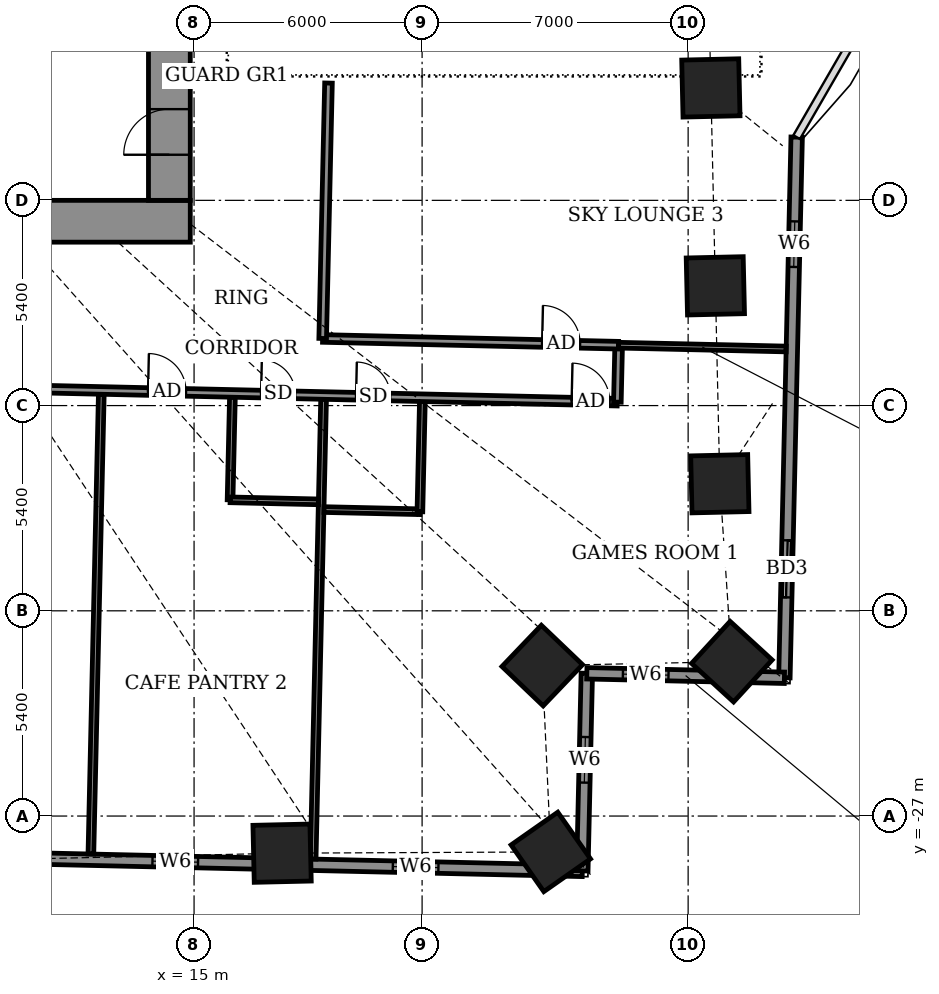
"""IFC4 building model, lengths in metres.
Left out: names, types, materials, properties, quantities, classifications, styles, units other than length and angle.
Written with IfcOpenShell. Run it as: python <this file> out.ifc"""

import sys

from ifc_helpers import new_model, si_unit, direction, frame, frame_2d, origin, origin_2d, place, context, subcontext, project, spatial, rectangle, extrude, element, fill, save


model = new_model("IFC4")
c1 = context("Model", 3, precision=1e-05, world=origin(), true_north=direction((0.0, 1.0)))
c2 = subcontext(c1, "Body", "Model", "MODEL_VIEW")
j1 = project(units=[si_unit("LENGTHUNIT", "METRE"), si_unit("PLANEANGLEUNIT", "RADIAN")], contexts=[c1])
p1 = place(None, origin())
s1 = spatial("IfcSite", under=j1, at=p1, CompositionType="ELEMENT")
p2 = place(p1, origin())
s2 = spatial("IfcBuilding", under=s1, at=p2, CompositionType="ELEMENT")
p3 = place(p2, frame((0.0, 0.0, 52.1)))
s3 = spatial("IfcBuildingStorey", under=s2, at=p3, CompositionType="ELEMENT", Elevation=52.1)
for number, where, z_axis, x_axis in (
    (1, (17.316, -27.977, -0.55), (0.0, 0.0, 1.0), (1.0, 0.023, 0.0)),
    (2, (24.386, -27.944, -0.55), (0.0, 0.0, 1.0), (0.819, 0.574, 0.0)),
    (3, (24.162, -23.041, -0.55), (0.0, 0.0, 1.0), (0.691, 0.723, 0.0)),
    (4, (29.15, -22.938, -0.55), (0.0, 0.0, 1.0), (0.676, 0.737, 0.0)),
    (5, (28.834, -18.256, -0.55), (0.0, 0.0, 1.0), (-0.023, 1.0, 0.0)),
    (6, (28.716, -13.049, -0.55), (0.0, 0.0, 1.0), (-0.023, 1.0, 0.0)),
    (7, (28.598, -7.842, -0.55), (0.0, 0.0, 1.0), (-0.023, 1.0, 0.0)),
):
    element("IfcColumn", number, at=place(p3, frame(where, z_axis=z_axis, x_axis=x_axis)), inside=s3, PredefinedType="COLUMN", context=c2, shape_type="SweptSolid", body=[
        extrude(rectangle(XDim=1.5, YDim=1.5, at=origin_2d()), origin(), (0.0, 0.0, 1.0), 4.6),
    ])
p4 = place(p3, frame((30.533, -23.362, 0.0), z_axis=(0.0, 0.0, 1.0), x_axis=(0.022698800888, 0.999742349027, 0.0)))
e8 = element("IfcWall", 8, at=p4, inside=s3, PredefinedType="SOLIDWALL", context=c2, shape_type="SweptSolid", body=[
    extrude(rectangle(XDim=14.23, YDim=0.3, at=frame_2d((7.115, 0.0))), origin(), (0.0, 0.0, 1.0), 2.25),
])
p5 = place(p4, frame((2.117, 0.0, 0.0)))
e9 = element("IfcOpeningElement", 9, at=p5, cuts=e8, PredefinedType="OPENING", context=c2, shape_type="SweptSolid", body=[
    extrude(rectangle(XDim=1.5, YDim=2.0, at=frame_2d((0.75, 1.0))), frame((0.0, 0.16, 0.0), z_axis=(0.0, -1.0, 0.0), x_axis=(1.0, 0.0, 0.0)), (0.0, 0.0, 1.0), 0.32),
])
p6 = place(p4, frame((10.812, 0.0, 0.5)))
e10 = element("IfcOpeningElement", 10, at=p6, cuts=e8, PredefinedType="OPENING", context=c2, shape_type="SweptSolid", body=[
    extrude(rectangle(XDim=1.2, YDim=1.1, at=frame_2d((0.6, 0.55))), frame((0.0, 0.16, 0.0), z_axis=(0.0, -1.0, 0.0), x_axis=(1.0, 0.0, 0.0)), (0.0, 0.0, 1.0), 0.32),
])
p7 = place(p3, frame((-24.007, -27.326, 0.0), z_axis=(0.0, 0.0, 1.0), x_axis=(0.999742536491, -0.022690542744, 0.0)))
e11 = element("IfcWall", 11, at=p7, inside=s3, PredefinedType="SOLIDWALL", context=c2, shape_type="SweptSolid", body=[
    extrude(rectangle(XDim=49.236, YDim=0.3, at=frame_2d((24.618, 0.0))), origin(), (0.0, 0.0, 1.0), 2.1),
])
p8 = place(p7, frame((0.878, 0.0, 0.0)))
e12 = element("IfcOpeningElement", 12, at=p8, cuts=e11, PredefinedType="OPENING", context=c2, shape_type="SweptSolid", body=[
    extrude(rectangle(XDim=1.5, YDim=2.0, at=frame_2d((0.75, 1.0))), frame((0.0, 0.16, 0.0), z_axis=(0.0, -1.0, 0.0), x_axis=(1.0, 0.0, 0.0)), (0.0, 0.0, 1.0), 0.32),
])
p9 = place(p7, frame((7.616, 0.0, 0.5)))
e13 = element("IfcOpeningElement", 13, at=p9, cuts=e11, PredefinedType="OPENING", context=c2, shape_type="SweptSolid", body=[
    extrude(rectangle(XDim=1.2, YDim=1.1, at=frame_2d((0.6, 0.55))), frame((0.0, 0.16, 0.0), z_axis=(0.0, -1.0, 0.0), x_axis=(1.0, 0.0, 0.0)), (0.0, 0.0, 1.0), 0.32),
])
p10 = place(p7, frame((15.205, 0.0, 0.0)))
e14 = element("IfcOpeningElement", 14, at=p10, cuts=e11, PredefinedType="OPENING", context=c2, shape_type="SweptSolid", body=[
    extrude(rectangle(XDim=1.5, YDim=2.0, at=frame_2d((0.75, 1.0))), frame((0.0, 0.16, 0.0), z_axis=(0.0, -1.0, 0.0), x_axis=(1.0, 0.0, 0.0)), (0.0, 0.0, 1.0), 0.32),
])
p11 = place(p7, frame((20.663, 0.0, 0.0)))
e15 = element("IfcOpeningElement", 15, at=p11, cuts=e11, PredefinedType="OPENING", context=c2, shape_type="SweptSolid", body=[
    extrude(rectangle(XDim=1.5, YDim=2.0, at=frame_2d((0.75, 1.0))), frame((0.0, 0.16, 0.0), z_axis=(0.0, -1.0, 0.0), x_axis=(1.0, 0.0, 0.0)), (0.0, 0.0, 1.0), 0.32),
])
p12 = place(p7, frame((23.869, 0.0, 0.0)))
e16 = element("IfcOpeningElement", 16, at=p12, cuts=e11, PredefinedType="OPENING", context=c2, shape_type="SweptSolid", body=[
    extrude(rectangle(XDim=1.5, YDim=2.0, at=frame_2d((0.75, 1.0))), frame((0.0, 0.16, 0.0), z_axis=(0.0, -1.0, 0.0), x_axis=(1.0, 0.0, 0.0)), (0.0, 0.0, 1.0), 0.32),
])
p13 = place(p7, frame((30.183, 0.0, 0.5)))
e17 = element("IfcOpeningElement", 17, at=p13, cuts=e11, PredefinedType="OPENING", context=c2, shape_type="SweptSolid", body=[
    extrude(rectangle(XDim=1.2, YDim=1.1, at=frame_2d((0.6, 0.55))), frame((0.0, 0.16, 0.0), z_axis=(0.0, -1.0, 0.0), x_axis=(1.0, 0.0, 0.0)), (0.0, 0.0, 1.0), 0.32),
])
p14 = place(p7, frame((37.922, 0.0, 0.5)))
e18 = element("IfcOpeningElement", 18, at=p14, cuts=e11, PredefinedType="OPENING", context=c2, shape_type="SweptSolid", body=[
    extrude(rectangle(XDim=1.2, YDim=1.1, at=frame_2d((0.6, 0.55))), frame((0.0, 0.16, 0.0), z_axis=(0.0, -1.0, 0.0), x_axis=(1.0, 0.0, 0.0)), (0.0, 0.0, 1.0), 0.32),
])
p15 = place(p7, frame((44.248, 0.0, 0.5)))
e19 = element("IfcOpeningElement", 19, at=p15, cuts=e11, PredefinedType="OPENING", context=c2, shape_type="SweptSolid", body=[
    extrude(rectangle(XDim=1.2, YDim=1.1, at=frame_2d((0.6, 0.55))), frame((0.0, 0.16, 0.0), z_axis=(0.0, -1.0, 0.0), x_axis=(1.0, 0.0, 0.0)), (0.0, 0.0, 1.0), 0.32),
])
p16 = place(p3, frame((25.216, -28.443, 0.0), z_axis=(0.0, 0.0, 1.0), x_axis=(0.022674484462, 0.999742900827, 0.0)))
e20 = element("IfcWall", 20, at=p16, inside=s3, PredefinedType="SOLIDWALL", context=c2, shape_type="SweptSolid", body=[
    extrude(rectangle(XDim=5.2, YDim=0.3, at=frame_2d((2.6, 0.0))), origin(), (0.0, 0.0, 1.0), 2.35),
])
p17 = place(p16, frame((2.323, 0.0, 0.5)))
e21 = element("IfcOpeningElement", 21, at=p17, cuts=e20, PredefinedType="OPENING", context=c2, shape_type="SweptSolid", body=[
    extrude(rectangle(XDim=1.2, YDim=1.1, at=frame_2d((0.6, 0.55))), frame((0.0, 0.16, 0.0), z_axis=(0.0, -1.0, 0.0), x_axis=(1.0, 0.0, 0.0)), (0.0, 0.0, 1.0), 0.32),
])
p18 = place(p3, frame((25.334, -23.244, 0.0), z_axis=(0.0, 0.0, 1.0), x_axis=(0.999741811307, -0.022722471786, 0.0)))
e22 = element("IfcWall", 22, at=p18, inside=s3, PredefinedType="SOLIDWALL", context=c2, shape_type="SweptSolid", body=[
    extrude(rectangle(XDim=5.2, YDim=0.3, at=frame_2d((2.6, 0.0))), origin(), (0.0, 0.0, 1.0), 2.25),
])
p19 = place(p18, frame((0.95, 0.0, 0.5)))
e23 = element("IfcOpeningElement", 23, at=p19, cuts=e22, PredefinedType="OPENING", context=c2, shape_type="SweptSolid", body=[
    extrude(rectangle(XDim=1.2, YDim=1.1, at=frame_2d((0.6, 0.55))), frame((0.0, 0.16, 0.0), z_axis=(0.0, -1.0, 0.0), x_axis=(1.0, 0.0, 0.0)), (0.0, 0.0, 1.0), 0.32),
])
p20 = place(p3, frame((12.285, -27.999, 0.0), z_axis=(0.0, 0.0, 1.0), x_axis=(0.022658614335, 0.999743260641, 0.0)))
e24 = element("IfcWall", 24, at=p20, inside=s3, PredefinedType="PARTITIONING", context=c2, shape_type="SweptSolid", body=[
    extrude(rectangle(XDim=12.1, YDim=0.15, at=frame_2d((6.05, 0.0))), origin(), (0.0, 0.0, 1.0), 2.15),
])
p21 = place(p3, frame((18.133, -28.132, 0.0), z_axis=(0.0, 0.0, 1.0), x_axis=(0.022718655443, 0.999741898039, 0.0)))
e25 = element("IfcWall", 25, at=p21, inside=s3, PredefinedType="PARTITIONING", context=c2, shape_type="SweptSolid", body=[
    extrude(rectangle(XDim=12.1, YDim=0.15, at=frame_2d((6.05, 0.0))), origin(), (0.0, 0.0, 1.0), 2.1),
])
p22 = place(p3, frame((18.419, -18.936, 0.0), z_axis=(0.0, 0.0, 1.0), x_axis=(0.999746356616, -0.022521599255, 0.0)))
e26 = element("IfcWall", 26, at=p22, inside=s3, PredefinedType="PARTITIONING", context=c2, shape_type="SweptSolid", body=[
    extrude(rectangle(XDim=2.526, YDim=0.15, at=frame_2d((1.263, 0.0))), origin(), (0.0, 0.0, 1.0), 2.35),
])
p23 = place(p3, frame((20.942, -18.993, 0.0), z_axis=(0.0, 0.0, 1.0), x_axis=(0.022480421481, 0.999747283392, 0.0)))
e27 = element("IfcWall", 27, at=p23, inside=s3, PredefinedType="PARTITIONING", context=c2, shape_type="SweptSolid", body=[
    extrude(rectangle(XDim=2.9, YDim=0.15, at=frame_2d((1.45, 0.0))), origin(), (0.0, 0.0, 1.0), 2.25),
])
p24 = place(p3, frame((15.947, -18.68, 0.0), z_axis=(0.0, 0.0, 1.0), x_axis=(0.022969966847, 0.999736155505, 0.0)))
e28 = element("IfcWall", 28, at=p24, inside=s3, PredefinedType="PARTITIONING", context=c2, shape_type="SweptSolid", body=[
    extrude(rectangle(XDim=2.7, YDim=0.15, at=frame_2d((1.35, 0.0))), origin(), (0.0, 0.0, 1.0), 2.1),
])
p25 = place(p3, frame((15.949, -18.68, 0.0), z_axis=(0.0, 0.0, 1.0), x_axis=(0.999740478815, -0.022781023197, 0.0)))
e29 = element("IfcWall", 29, at=p25, inside=s3, PredefinedType="PARTITIONING", context=c2, shape_type="SweptSolid", body=[
    extrude(rectangle(XDim=2.325, YDim=0.15, at=frame_2d((1.163, 0.0))), origin(), (0.0, 0.0, 1.0), 2.1),
])
p26 = place(p3, frame((-26.876, -14.907, 0.0), z_axis=(0.0, 0.0, 1.0), x_axis=(0.99974254105, -0.022690341881, 0.0)))
e30 = element("IfcWall", 30, at=p26, inside=s3, PredefinedType="PARTITIONING", context=c2, shape_type="SweptSolid", body=[
    extrude(rectangle(XDim=53.024, YDim=0.2, at=frame_2d((26.512, 0.0))), origin(), (0.0, 0.0, 1.0), 2.1),
])
p27 = place(p26, frame((3.599, 0.0, 0.0)))
e31 = element("IfcOpeningElement", 31, at=p27, cuts=e30, PredefinedType="OPENING", context=c2, shape_type="SweptSolid", body=[
    extrude(rectangle(XDim=1.0, YDim=2.1, at=frame_2d((0.5, 1.05))), frame((0.0, 0.11, 0.0), z_axis=(0.0, -1.0, 0.0), x_axis=(1.0, 0.0, 0.0)), (0.0, 0.0, 1.0), 0.22),
])
p28 = place(p26, frame((13.425, 0.0, 0.0)))
e32 = element("IfcOpeningElement", 32, at=p28, cuts=e30, PredefinedType="OPENING", context=c2, shape_type="SweptSolid", body=[
    extrude(rectangle(XDim=1.0, YDim=2.1, at=frame_2d((0.5, 1.05))), frame((0.0, 0.11, 0.0), z_axis=(0.0, -1.0, 0.0), x_axis=(1.0, 0.0, 0.0)), (0.0, 0.0, 1.0), 0.22),
])
p29 = place(p26, frame((9.5, 0.0, 0.0)))
e33 = element("IfcOpeningElement", 33, at=p29, cuts=e30, PredefinedType="OPENING", context=c2, shape_type="SweptSolid", body=[
    extrude(rectangle(XDim=0.9, YDim=2.1, at=frame_2d((0.45, 1.05))), frame((0.0, 0.11, 0.0), z_axis=(0.0, -1.0, 0.0), x_axis=(1.0, 0.0, 0.0)), (0.0, 0.0, 1.0), 0.22),
])
p30 = place(p26, frame((17.525, 0.0, 0.0)))
e34 = element("IfcOpeningElement", 34, at=p30, cuts=e30, PredefinedType="OPENING", context=c2, shape_type="SweptSolid", body=[
    extrude(rectangle(XDim=0.9, YDim=2.1, at=frame_2d((0.45, 1.05))), frame((0.0, 0.11, 0.0), z_axis=(0.0, -1.0, 0.0), x_axis=(1.0, 0.0, 0.0)), (0.0, 0.0, 1.0), 0.22),
])
p31 = place(p26, frame((24.85, 0.0, 0.0)))
e35 = element("IfcOpeningElement", 35, at=p31, cuts=e30, PredefinedType="OPENING", context=c2, shape_type="SweptSolid", body=[
    extrude(rectangle(XDim=0.9, YDim=2.1, at=frame_2d((0.45, 1.05))), frame((0.0, 0.11, 0.0), z_axis=(0.0, -1.0, 0.0), x_axis=(1.0, 0.0, 0.0)), (0.0, 0.0, 1.0), 0.22),
])
p32 = place(p26, frame((27.35, 0.0, 0.0)))
e36 = element("IfcOpeningElement", 36, at=p32, cuts=e30, PredefinedType="OPENING", context=c2, shape_type="SweptSolid", body=[
    extrude(rectangle(XDim=0.9, YDim=2.1, at=frame_2d((0.45, 1.05))), frame((0.0, 0.11, 0.0), z_axis=(0.0, -1.0, 0.0), x_axis=(1.0, 0.0, 0.0)), (0.0, 0.0, 1.0), 0.22),
])
p33 = place(p26, frame((36.15, 0.0, 0.0)))
e37 = element("IfcOpeningElement", 37, at=p33, cuts=e30, PredefinedType="OPENING", context=c2, shape_type="SweptSolid", body=[
    extrude(rectangle(XDim=1.0, YDim=2.1, at=frame_2d((0.5, 1.05))), frame((0.0, 0.11, 0.0), z_axis=(0.0, -1.0, 0.0), x_axis=(1.0, 0.0, 0.0)), (0.0, 0.0, 1.0), 0.22),
])
p34 = place(p26, frame((32.2, 0.0, 0.0)))
e38 = element("IfcOpeningElement", 38, at=p34, cuts=e30, PredefinedType="OPENING", context=c2, shape_type="SweptSolid", body=[
    extrude(rectangle(XDim=0.9, YDim=2.1, at=frame_2d((0.45, 1.05))), frame((0.0, 0.11, 0.0), z_axis=(0.0, -1.0, 0.0), x_axis=(1.0, 0.0, 0.0)), (0.0, 0.0, 1.0), 0.22),
])
p35 = place(p26, frame((40.675, 0.0, 0.0)))
e39 = element("IfcOpeningElement", 39, at=p35, cuts=e30, PredefinedType="OPENING", context=c2, shape_type="SweptSolid", body=[
    extrude(rectangle(XDim=1.0, YDim=2.1, at=frame_2d((0.5, 1.05))), frame((0.0, 0.11, 0.0), z_axis=(0.0, -1.0, 0.0), x_axis=(1.0, 0.0, 0.0)), (0.0, 0.0, 1.0), 0.22),
])
p36 = place(p26, frame((43.65, 0.0, 0.0)))
e40 = element("IfcOpeningElement", 40, at=p36, cuts=e30, PredefinedType="OPENING", context=c2, shape_type="SweptSolid", body=[
    extrude(rectangle(XDim=0.9, YDim=2.1, at=frame_2d((0.45, 1.05))), frame((0.0, 0.11, 0.0), z_axis=(0.0, -1.0, 0.0), x_axis=(1.0, 0.0, 0.0)), (0.0, 0.0, 1.0), 0.22),
])
p37 = place(p26, frame((51.824, 0.0, 0.0)))
e41 = element("IfcOpeningElement", 41, at=p37, cuts=e30, PredefinedType="OPENING", context=c2, shape_type="SweptSolid", body=[
    extrude(rectangle(XDim=1.0, YDim=2.1, at=frame_2d((0.5, 1.05))), frame((0.0, 0.11, 0.0), z_axis=(0.0, -1.0, 0.0), x_axis=(1.0, 0.0, 0.0)), (0.0, 0.0, 1.0), 0.22),
])
p38 = place(p26, frame((46.15, 0.0, 0.0)))
e42 = element("IfcOpeningElement", 42, at=p38, cuts=e30, PredefinedType="OPENING", context=c2, shape_type="SweptSolid", body=[
    extrude(rectangle(XDim=0.9, YDim=2.1, at=frame_2d((0.45, 1.05))), frame((0.0, 0.11, 0.0), z_axis=(0.0, -1.0, 0.0), x_axis=(1.0, 0.0, 0.0)), (0.0, 0.0, 1.0), 0.22),
])
p39 = place(p3, frame((26.138, -16.11, 0.0), z_axis=(0.0, 0.0, 1.0), x_axis=(0.02279537805, 0.999740151609, 0.0)))
e43 = element("IfcWall", 43, at=p39, inside=s3, PredefinedType="PARTITIONING", context=c2, shape_type="SweptSolid", body=[
    extrude(rectangle(XDim=1.5, YDim=0.2, at=frame_2d((0.75, 0.0))), origin(), (0.0, 0.0, 1.0), 4.05),
])
p40 = place(p3, frame((18.382, -14.434, 0.0), z_axis=(0.0, 0.0, 1.0), x_axis=(0.999741689867, -0.022727814278, 0.0)))
e44 = element("IfcWall", 44, at=p40, inside=s3, PredefinedType="PARTITIONING", context=c2, shape_type="SweptSolid", body=[
    extrude(rectangle(XDim=7.788, YDim=0.2, at=frame_2d((3.894, 0.0))), origin(), (0.0, 0.0, 1.0), 2.25),
])
p41 = place(p40, frame((5.777, 0.0, 0.0)))
e45 = element("IfcOpeningElement", 45, at=p41, cuts=e44, PredefinedType="OPENING", context=c2, shape_type="SweptSolid", body=[
    extrude(rectangle(XDim=1.0, YDim=2.1, at=frame_2d((0.5, 1.05))), frame((0.0, 0.11, 0.0), z_axis=(0.0, -1.0, 0.0), x_axis=(1.0, 0.0, 0.0)), (0.0, 0.0, 1.0), 0.22),
])
p42 = place(p3, frame((18.384, -14.434, 0.0), z_axis=(0.0, 0.0, 1.0), x_axis=(0.022773383809, 0.999740652864, 0.0)))
e46 = element("IfcWall", 46, at=p42, inside=s3, PredefinedType="PARTITIONING", context=c2, shape_type="SweptSolid", body=[
    extrude(rectangle(XDim=6.722, YDim=0.2, at=frame_2d((3.361, 0.0))), origin(), (0.0, 0.0, 1.0), 2.25),
])
p43 = place(p3, frame((26.168, -14.611, 0.0), z_axis=(0.0, 0.0, 1.0), x_axis=(0.999743888199, -0.022630908251, 0.0)))
e47 = element("IfcWall", 47, at=p43, inside=s3, PredefinedType="PARTITIONING", context=c2, shape_type="SweptSolid", body=[
    extrude(rectangle(XDim=4.412, YDim=0.15, at=frame_2d((2.206, 0.0))), origin(), (0.0, 0.0, 1.0), 2.35),
])
p44 = place(p3, frame((-14.9, -11.35, 0.0), z_axis=(0.0, 0.0, 1.0), x_axis=(1.0, 0.0, 0.0)))
e48 = element("IfcWall", 48, at=p44, inside=s3, PredefinedType="SHEAR", context=c2, shape_type="SweptSolid", body=[
    extrude(rectangle(XDim=29.8, YDim=1.1, at=frame_2d((14.9, 0.0))), origin(), (0.0, 0.0, 1.0), 4.6),
])
p45 = place(p3, frame((14.35, -10.8, 0.0), z_axis=(0.0, 0.0, 1.0), x_axis=(0.0, 1.0, 0.0)))
e49 = element("IfcWall", 49, at=p45, inside=s3, PredefinedType="SHEAR", context=c2, shape_type="SweptSolid", body=[
    extrude(rectangle(XDim=21.6, YDim=1.1, at=frame_2d((10.8, 0.0))), origin(), (0.0, 0.0, 1.0), 4.6),
])
p46 = place(p45, frame((1.2, 0.0, 0.0)))
e50 = element("IfcOpeningElement", 50, at=p46, cuts=e49, PredefinedType="OPENING", context=c2, shape_type="SweptSolid", body=[
    extrude(rectangle(XDim=1.2, YDim=2.1, at=frame_2d((0.6, 1.05))), frame((0.0, 0.56, 0.0), z_axis=(0.0, -1.0, 0.0), x_axis=(1.0, 0.0, 0.0)), (0.0, 0.0, 1.0), 1.12),
])
p47 = place(p5, origin())
e51 = element("IfcDoor", 51, at=p47, inside=s3, OperationType="SLIDING_TO_LEFT", PredefinedType="DOOR", context=c2, shape_type="SweptSolid", body=[
    extrude(rectangle(XDim=1.5, YDim=2.0, at=frame_2d((0.75, 1.0))), frame((0.0, 0.025, 0.0), z_axis=(0.0, -1.0, 0.0), x_axis=(1.0, 0.0, 0.0)), (0.0, 0.0, 1.0), 0.05),
])
fill(e9, e51)
p48 = place(p6, origin())
e52 = element("IfcWindow", 52, at=p48, inside=s3, PartitioningType="SINGLE_PANEL", PredefinedType="WINDOW", context=c2, shape_type="SweptSolid", body=[
    extrude(rectangle(XDim=1.2, YDim=1.1, at=frame_2d((0.6, 0.55))), frame((0.0, 0.03, 0.0), z_axis=(0.0, -1.0, 0.0), x_axis=(1.0, 0.0, 0.0)), (0.0, 0.0, 1.0), 0.06),
])
fill(e10, e52)
p49 = place(p14, origin())
e53 = element("IfcWindow", 53, at=p49, inside=s3, PartitioningType="SINGLE_PANEL", PredefinedType="WINDOW", context=c2, shape_type="SweptSolid", body=[
    extrude(rectangle(XDim=1.2, YDim=1.1, at=frame_2d((0.6, 0.55))), frame((0.0, 0.03, 0.0), z_axis=(0.0, -1.0, 0.0), x_axis=(1.0, 0.0, 0.0)), (0.0, 0.0, 1.0), 0.06),
])
fill(e18, e53)
p50 = place(p15, origin())
e54 = element("IfcWindow", 54, at=p50, inside=s3, PartitioningType="SINGLE_PANEL", PredefinedType="WINDOW", context=c2, shape_type="SweptSolid", body=[
    extrude(rectangle(XDim=1.2, YDim=1.1, at=frame_2d((0.6, 0.55))), frame((0.0, 0.03, 0.0), z_axis=(0.0, -1.0, 0.0), x_axis=(1.0, 0.0, 0.0)), (0.0, 0.0, 1.0), 0.06),
])
fill(e19, e54)
p51 = place(p17, origin())
e55 = element("IfcWindow", 55, at=p51, inside=s3, PartitioningType="SINGLE_PANEL", PredefinedType="WINDOW", context=c2, shape_type="SweptSolid", body=[
    extrude(rectangle(XDim=1.2, YDim=1.1, at=frame_2d((0.6, 0.55))), frame((0.0, 0.03, 0.0), z_axis=(0.0, -1.0, 0.0), x_axis=(1.0, 0.0, 0.0)), (0.0, 0.0, 1.0), 0.06),
])
fill(e21, e55)
p52 = place(p19, origin())
e56 = element("IfcWindow", 56, at=p52, inside=s3, PartitioningType="SINGLE_PANEL", PredefinedType="WINDOW", context=c2, shape_type="SweptSolid", body=[
    extrude(rectangle(XDim=1.2, YDim=1.1, at=frame_2d((0.6, 0.55))), frame((0.0, 0.03, 0.0), z_axis=(0.0, -1.0, 0.0), x_axis=(1.0, 0.0, 0.0)), (0.0, 0.0, 1.0), 0.06),
])
fill(e23, e56)
p53 = place(p35, origin())
e57 = element("IfcDoor", 57, at=p53, inside=s3, OperationType="SINGLE_SWING_RIGHT", PredefinedType="DOOR", context=c2, shape_type="SweptSolid", body=[
    extrude(rectangle(XDim=1.0, YDim=2.1, at=frame_2d((0.5, 1.05))), frame((0.0, 0.025, 0.0), z_axis=(0.0, -1.0, 0.0), x_axis=(1.0, 0.0, 0.0)), (0.0, 0.0, 1.0), 0.05),
])
fill(e39, e57)
p54 = place(p36, origin())
e58 = element("IfcDoor", 58, at=p54, inside=s3, OperationType="SINGLE_SWING_LEFT", PredefinedType="DOOR", context=c2, shape_type="SweptSolid", body=[
    extrude(rectangle(XDim=0.9, YDim=2.1, at=frame_2d((0.45, 1.05))), frame((0.0, 0.025, 0.0), z_axis=(0.0, -1.0, 0.0), x_axis=(1.0, 0.0, 0.0)), (0.0, 0.0, 1.0), 0.05),
])
fill(e40, e58)
p55 = place(p37, origin())
e59 = element("IfcDoor", 59, at=p55, inside=s3, OperationType="SINGLE_SWING_LEFT", PredefinedType="DOOR", context=c2, shape_type="SweptSolid", body=[
    extrude(rectangle(XDim=1.0, YDim=2.1, at=frame_2d((0.5, 1.05))), frame((0.0, 0.025, 0.0), z_axis=(0.0, -1.0, 0.0), x_axis=(1.0, 0.0, 0.0)), (0.0, 0.0, 1.0), 0.05),
])
fill(e41, e59)
p56 = place(p38, origin())
e60 = element("IfcDoor", 60, at=p56, inside=s3, OperationType="SINGLE_SWING_RIGHT", PredefinedType="DOOR", context=c2, shape_type="SweptSolid", body=[
    extrude(rectangle(XDim=0.9, YDim=2.1, at=frame_2d((0.45, 1.05))), frame((0.0, 0.025, 0.0), z_axis=(0.0, -1.0, 0.0), x_axis=(1.0, 0.0, 0.0)), (0.0, 0.0, 1.0), 0.05),
])
fill(e42, e60)
p57 = place(p41, origin())
e61 = element("IfcDoor", 61, at=p57, inside=s3, OperationType="SINGLE_SWING_RIGHT", PredefinedType="DOOR", context=c2, shape_type="SweptSolid", body=[
    extrude(rectangle(XDim=1.0, YDim=2.1, at=frame_2d((0.5, 1.05))), frame((0.0, 0.025, 0.0), z_axis=(0.0, -1.0, 0.0), x_axis=(1.0, 0.0, 0.0)), (0.0, 0.0, 1.0), 0.05),
])
fill(e45, e61)
p58 = place(p46, origin())
e62 = element("IfcDoor", 62, at=p58, inside=s3, OperationType="DOUBLE_DOOR_SINGLE_SWING", PredefinedType="DOOR", context=c2, shape_type="SweptSolid", body=[
    extrude(rectangle(XDim=1.2, YDim=2.1, at=frame_2d((0.6, 1.05))), frame((0.0, 0.025, 0.0), z_axis=(0.0, -1.0, 0.0), x_axis=(1.0, 0.0, 0.0)), (0.0, 0.0, 1.0), 0.05),
])
fill(e50, e62)
save(model, sys.argv[1])
